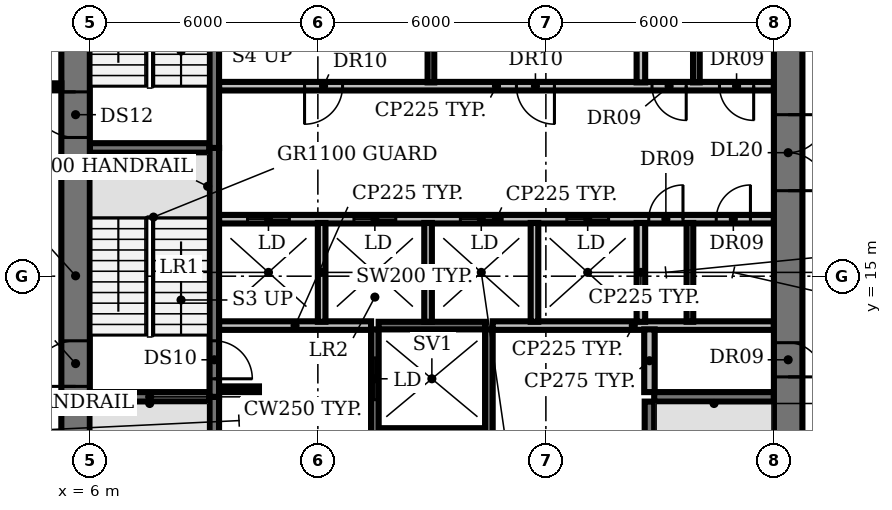
"""IFC4 building model, lengths in metres.
Left out: names, types, materials, properties, quantities, classifications, styles, units other than length and angle.
Written with IfcOpenShell. Run it as: python <this file> out.ifc"""

import sys

from ifc_helpers import new_model, si_unit, direction, frame, frame_2d, origin, place, context, subcontext, project, spatial, rectangle, extrude, element, fill, save


model = new_model("IFC4")
c1 = context("Model", 3, precision=1e-05, world=origin(), true_north=direction((0.0, 1.0)))
c2 = subcontext(c1, "Body", "Model", "MODEL_VIEW")
j1 = project(units=[si_unit("LENGTHUNIT", "METRE"), si_unit("PLANEANGLEUNIT", "RADIAN")], contexts=[c1])
p1 = place(None, origin())
s1 = spatial("IfcSite", under=j1, at=p1, CompositionType="ELEMENT")
p2 = place(p1, origin())
s2 = spatial("IfcBuilding", under=s1, at=p2, CompositionType="ELEMENT")
p3 = place(p2, frame((0.0, 0.0, 113.0)))
s3 = spatial("IfcBuildingStorey", under=s2, at=p3, CompositionType="ELEMENT", Elevation=113.0)
p4 = place(p3, frame((13.6, 10.9, 0.0), z_axis=(0.0, 0.0, 1.0), x_axis=(1.0, 0.0, 0.0)))
e1 = element("IfcWall", 1, at=p4, inside=s3, PredefinedType="SHEAR", context=c2, shape_type="SweptSolid", body=[
    extrude(rectangle(XDim=2.8, YDim=0.2, at=frame_2d((1.4, 0.0))), origin(), (0.0, 0.0, 1.0), 3.85),
])
for number, where, z_axis, x_axis in (
    (2, (6.0, 11.825, 0.0), (0.0, 0.0, 1.0), (1.0, 0.0, 0.0)),
    (3, (20.85, 11.825, 0.0), (0.0, 0.0, 1.0), (1.0, 0.0, 0.0)),
):
    element("IfcWall", number, at=place(p3, frame(where, z_axis=z_axis, x_axis=x_axis)), inside=s3, PredefinedType="SHEAR", context=c2, shape_type="SweptSolid", body=[
        extrude(rectangle(XDim=3.15, YDim=0.25, at=frame_2d((1.575, 0.0))), origin(), (0.0, 0.0, 1.0), 3.85),
    ])
p5 = place(p3, frame((9.4, 12.025, 0.0), z_axis=(0.0, 0.0, 1.0), x_axis=(1.0, 0.0, 0.0)))
e4 = element("IfcWall", 4, at=p5, inside=s3, PredefinedType="SHEAR", context=c2, shape_type="SweptSolid", body=[
    extrude(rectangle(XDim=1.05, YDim=0.15, at=frame_2d((0.525, 0.0))), origin(), (0.0, 0.0, 1.0), 3.85),
])
p6 = place(p3, frame((9.4, 13.7, 0.0), z_axis=(0.0, 0.0, 1.0), x_axis=(1.0, 0.0, 0.0)))
e5 = element("IfcWall", 5, at=p6, inside=s3, PredefinedType="PARTITIONING", context=c2, shape_type="SweptSolid", body=[
    extrude(rectangle(XDim=4.0, YDim=0.225, at=frame_2d((2.0, 0.0))), origin(), (0.0, 0.0, 1.0), 3.85),
])
p7 = place(p3, frame((13.6, 13.7, 0.0), z_axis=(0.0, 0.0, 1.0), x_axis=(1.0, 0.0, 0.0)))
e6 = element("IfcWall", 6, at=p7, inside=s3, PredefinedType="SHEAR", context=c2, shape_type="SweptSolid", body=[
    extrude(rectangle(XDim=2.8, YDim=0.2, at=frame_2d((1.4, 0.0))), origin(), (0.0, 0.0, 1.0), 3.85),
])
p8 = place(p3, frame((16.6, 13.7, 0.0), z_axis=(0.0, 0.0, 1.0), x_axis=(1.0, 0.0, 0.0)))
e7 = element("IfcWall", 7, at=p8, inside=s3, PredefinedType="PARTITIONING", context=c2, shape_type="SweptSolid", body=[
    extrude(rectangle(XDim=7.4, YDim=0.225, at=frame_2d((3.7, 0.0))), origin(), (0.0, 0.0, 1.0), 3.85),
])
p9 = place(p3, frame((9.4, 16.5, 0.0), z_axis=(0.0, 0.0, 1.0), x_axis=(1.0, 0.0, 0.0)))
e8 = element("IfcWall", 8, at=p9, inside=s3, PredefinedType="PARTITIONING", context=c2, shape_type="SweptSolid", body=[
    extrude(rectangle(XDim=14.6, YDim=0.225, at=frame_2d((7.3, 0.0))), origin(), (0.0, 0.0, 1.0), 3.85),
])
p10 = place(p9, frame((0.75, 0.0, 0.0)))
e9 = element("IfcOpeningElement", 9, at=p10, cuts=e8, PredefinedType="OPENING", context=c2, shape_type="SweptSolid", body=[
    extrude(rectangle(XDim=1.1, YDim=2.1, at=frame_2d((0.55, 1.05))), frame((0.0, 0.123, 0.0), z_axis=(0.0, -1.0, 0.0), x_axis=(1.0, 0.0, 0.0)), (0.0, 0.0, 1.0), 0.245),
])
p11 = place(p9, frame((3.55, 0.0, 0.0)))
e10 = element("IfcOpeningElement", 10, at=p11, cuts=e8, PredefinedType="OPENING", context=c2, shape_type="SweptSolid", body=[
    extrude(rectangle(XDim=1.1, YDim=2.1, at=frame_2d((0.55, 1.05))), frame((0.0, 0.123, 0.0), z_axis=(0.0, -1.0, 0.0), x_axis=(1.0, 0.0, 0.0)), (0.0, 0.0, 1.0), 0.245),
])
p12 = place(p9, frame((6.35, 0.0, 0.0)))
e11 = element("IfcOpeningElement", 11, at=p12, cuts=e8, PredefinedType="OPENING", context=c2, shape_type="SweptSolid", body=[
    extrude(rectangle(XDim=1.1, YDim=2.1, at=frame_2d((0.55, 1.05))), frame((0.0, 0.123, 0.0), z_axis=(0.0, -1.0, 0.0), x_axis=(1.0, 0.0, 0.0)), (0.0, 0.0, 1.0), 0.245),
])
p13 = place(p9, frame((9.15, 0.0, 0.0)))
e12 = element("IfcOpeningElement", 12, at=p13, cuts=e8, PredefinedType="OPENING", context=c2, shape_type="SweptSolid", body=[
    extrude(rectangle(XDim=1.1, YDim=2.1, at=frame_2d((0.55, 1.05))), frame((0.0, 0.123, 0.0), z_axis=(0.0, -1.0, 0.0), x_axis=(1.0, 0.0, 0.0)), (0.0, 0.0, 1.0), 0.245),
])
p14 = place(p9, frame((11.308, 0.0, 0.0)))
e13 = element("IfcOpeningElement", 13, at=p14, cuts=e8, PredefinedType="OPENING", context=c2, shape_type="SweptSolid", body=[
    extrude(rectangle(XDim=0.9, YDim=2.1, at=frame_2d((0.45, 1.05))), frame((0.0, 0.123, 0.0), z_axis=(0.0, -1.0, 0.0), x_axis=(1.0, 0.0, 0.0)), (0.0, 0.0, 1.0), 0.245),
])
p15 = place(p9, frame((13.083, 0.0, 0.0)))
e14 = element("IfcOpeningElement", 14, at=p15, cuts=e8, PredefinedType="OPENING", context=c2, shape_type="SweptSolid", body=[
    extrude(rectangle(XDim=0.9, YDim=2.1, at=frame_2d((0.45, 1.05))), frame((0.0, 0.123, 0.0), z_axis=(0.0, -1.0, 0.0), x_axis=(1.0, 0.0, 0.0)), (0.0, 0.0, 1.0), 0.245),
])
p16 = place(p3, frame((6.0, 18.375, 0.0), z_axis=(0.0, 0.0, 1.0), x_axis=(1.0, 0.0, 0.0)))
e15 = element("IfcWall", 15, at=p16, inside=s3, PredefinedType="SHEAR", context=c2, shape_type="SweptSolid", body=[
    extrude(rectangle(XDim=3.15, YDim=0.25, at=frame_2d((1.575, 0.0))), origin(), (0.0, 0.0, 1.0), 3.85),
])
p17 = place(p3, frame((24.0, 20.0, 0.0), z_axis=(0.0, 0.0, 1.0), x_axis=(-1.0, 0.0, 0.0)))
e16 = element("IfcWall", 16, at=p17, inside=s3, PredefinedType="PARTITIONING", context=c2, shape_type="SweptSolid", body=[
    extrude(rectangle(XDim=14.6, YDim=0.225, at=frame_2d((7.3, 0.0))), origin(), (0.0, 0.0, 1.0), 3.85),
])
p18 = place(p17, frame((11.35, 0.0, 0.0)))
e17 = element("IfcOpeningElement", 17, at=p18, cuts=e16, PredefinedType="OPENING", context=c2, shape_type="SweptSolid", body=[
    extrude(rectangle(XDim=1.0, YDim=2.1, at=frame_2d((0.5, 1.05))), frame((0.0, 0.123, 0.0), z_axis=(0.0, -1.0, 0.0), x_axis=(1.0, 0.0, 0.0)), (0.0, 0.0, 1.0), 0.245),
])
p19 = place(p17, frame((5.775, 0.0, 0.0)))
e18 = element("IfcOpeningElement", 18, at=p19, cuts=e16, PredefinedType="OPENING", context=c2, shape_type="SweptSolid", body=[
    extrude(rectangle(XDim=1.0, YDim=2.1, at=frame_2d((0.5, 1.05))), frame((0.0, 0.123, 0.0), z_axis=(0.0, -1.0, 0.0), x_axis=(1.0, 0.0, 0.0)), (0.0, 0.0, 1.0), 0.245),
])
p20 = place(p17, frame((2.308, 0.0, 0.0)))
e19 = element("IfcOpeningElement", 19, at=p20, cuts=e16, PredefinedType="OPENING", context=c2, shape_type="SweptSolid", body=[
    extrude(rectangle(XDim=0.9, YDim=2.1, at=frame_2d((0.45, 1.05))), frame((0.0, 0.123, 0.0), z_axis=(0.0, -1.0, 0.0), x_axis=(1.0, 0.0, 0.0)), (0.0, 0.0, 1.0), 0.245),
])
p21 = place(p17, frame((0.532, 0.0, 0.0)))
e20 = element("IfcOpeningElement", 20, at=p21, cuts=e16, PredefinedType="OPENING", context=c2, shape_type="SweptSolid", body=[
    extrude(rectangle(XDim=0.9, YDim=2.1, at=frame_2d((0.45, 1.05))), frame((0.0, 0.123, 0.0), z_axis=(0.0, -1.0, 0.0), x_axis=(1.0, 0.0, 0.0)), (0.0, 0.0, 1.0), 0.245),
])
p22 = place(p3, frame((9.275, 11.825, 0.0), z_axis=(0.0, 0.0, 1.0), x_axis=(0.0, -1.0, 0.0)))
e21 = element("IfcWall", 21, at=p22, inside=s3, PredefinedType="SHEAR", context=c2, shape_type="SweptSolid", body=[
    extrude(rectangle(XDim=6.425, YDim=0.25, at=frame_2d((3.212, 0.0))), origin(), (0.0, 0.0, 1.0), 3.85),
])
p23 = place(p22, frame((5.075, 0.0, 0.0)))
e22 = element("IfcOpeningElement", 22, at=p23, cuts=e21, PredefinedType="OPENING", context=c2, shape_type="SweptSolid", body=[
    extrude(rectangle(XDim=1.0, YDim=2.1, at=frame_2d((0.5, 1.05))), frame((0.0, 0.135, 0.0), z_axis=(0.0, -1.0, 0.0), x_axis=(1.0, 0.0, 0.0)), (0.0, 0.0, 1.0), 0.27),
])
p24 = place(p3, frame((9.275, 18.375, 0.0), z_axis=(0.0, 0.0, 1.0), x_axis=(0.0, -1.0, 0.0)))
e23 = element("IfcWall", 23, at=p24, inside=s3, PredefinedType="SHEAR", context=c2, shape_type="SweptSolid", body=[
    extrude(rectangle(XDim=6.55, YDim=0.25, at=frame_2d((3.275, 0.0))), origin(), (0.0, 0.0, 1.0), 3.85),
])
p25 = place(p24, frame((5.075, 0.0, 0.0)))
e24 = element("IfcOpeningElement", 24, at=p25, cuts=e23, PredefinedType="OPENING", context=c2, shape_type="SweptSolid", body=[
    extrude(rectangle(XDim=1.0, YDim=2.1, at=frame_2d((0.5, 1.05))), frame((0.0, 0.135, 0.0), z_axis=(0.0, -1.0, 0.0), x_axis=(1.0, 0.0, 0.0)), (0.0, 0.0, 1.0), 0.27),
])
p26 = place(p3, frame((9.275, 18.375, 0.0), z_axis=(0.0, 0.0, 1.0), x_axis=(0.0, 1.0, 0.0)))
e25 = element("IfcWall", 25, at=p26, inside=s3, PredefinedType="SHEAR", context=c2, shape_type="SweptSolid", body=[
    extrude(rectangle(XDim=6.425, YDim=0.25, at=frame_2d((3.212, 0.0))), origin(), (0.0, 0.0, 1.0), 3.85),
])
p27 = place(p3, frame((12.1, 13.8, 0.0), z_axis=(0.0, 0.0, 1.0), x_axis=(0.0, 1.0, 0.0)))
e26 = element("IfcWall", 26, at=p27, inside=s3, PredefinedType="SOLIDWALL", context=c2, shape_type="SweptSolid", body=[
    extrude(rectangle(XDim=2.6, YDim=0.2, at=frame_2d((1.3, 0.0))), origin(), (0.0, 0.0, 1.0), 3.85),
])
p28 = place(p3, frame((13.5, 5.4, 0.0), z_axis=(0.0, 0.0, 1.0), x_axis=(0.0, 1.0, 0.0)))
e27 = element("IfcWall", 27, at=p28, inside=s3, PredefinedType="SHEAR", context=c2, shape_type="SweptSolid", body=[
    extrude(rectangle(XDim=8.2, YDim=0.2, at=frame_2d((4.1, 0.0))), origin(), (0.0, 0.0, 1.0), 3.85),
])
p29 = place(p28, frame((0.75, 0.0, 0.0)))
e28 = element("IfcOpeningElement", 28, at=p29, cuts=e27, PredefinedType="OPENING", context=c2, shape_type="SweptSolid", body=[
    extrude(rectangle(XDim=1.1, YDim=2.1, at=frame_2d((0.55, 1.05))), frame((0.0, 0.11, 0.0), z_axis=(0.0, -1.0, 0.0), x_axis=(1.0, 0.0, 0.0)), (0.0, 0.0, 1.0), 0.22),
])
p30 = place(p28, frame((3.55, 0.0, 0.0)))
e29 = element("IfcOpeningElement", 29, at=p30, cuts=e27, PredefinedType="OPENING", context=c2, shape_type="SweptSolid", body=[
    extrude(rectangle(XDim=1.1, YDim=2.1, at=frame_2d((0.55, 1.05))), frame((0.0, 0.11, 0.0), z_axis=(0.0, -1.0, 0.0), x_axis=(1.0, 0.0, 0.0)), (0.0, 0.0, 1.0), 0.22),
])
p31 = place(p28, frame((6.35, 0.0, 0.0)))
e30 = element("IfcOpeningElement", 30, at=p31, cuts=e27, PredefinedType="OPENING", context=c2, shape_type="SweptSolid", body=[
    extrude(rectangle(XDim=1.1, YDim=2.1, at=frame_2d((0.55, 1.05))), frame((0.0, 0.11, 0.0), z_axis=(0.0, -1.0, 0.0), x_axis=(1.0, 0.0, 0.0)), (0.0, 0.0, 1.0), 0.22),
])
p32 = place(p3, frame((14.9, 13.8, 0.0), z_axis=(0.0, 0.0, 1.0), x_axis=(0.0, 1.0, 0.0)))
e31 = element("IfcWall", 31, at=p32, inside=s3, PredefinedType="SOLIDWALL", context=c2, shape_type="SweptSolid", body=[
    extrude(rectangle(XDim=2.6, YDim=0.2, at=frame_2d((1.3, 0.0))), origin(), (0.0, 0.0, 1.0), 3.85),
])
p33 = place(p3, frame((14.975, 20.1, 0.0), z_axis=(0.0, 0.0, 1.0), x_axis=(0.0, 1.0, 0.0)))
e32 = element("IfcWall", 32, at=p33, inside=s3, PredefinedType="PARTITIONING", context=c2, shape_type="SweptSolid", body=[
    extrude(rectangle(XDim=2.6, YDim=0.175, at=frame_2d((1.3, 0.0))), origin(), (0.0, 0.0, 1.0), 3.85),
])
p34 = place(p3, frame((16.5, 5.4, 0.0), z_axis=(0.0, 0.0, 1.0), x_axis=(0.0, 1.0, 0.0)))
e33 = element("IfcWall", 33, at=p34, inside=s3, PredefinedType="SHEAR", context=c2, shape_type="SweptSolid", body=[
    extrude(rectangle(XDim=8.2, YDim=0.2, at=frame_2d((4.1, 0.0))), origin(), (0.0, 0.0, 1.0), 3.85),
])
p35 = place(p3, frame((17.7, 13.8, 0.0), z_axis=(0.0, 0.0, 1.0), x_axis=(0.0, 1.0, 0.0)))
e34 = element("IfcWall", 34, at=p35, inside=s3, PredefinedType="SOLIDWALL", context=c2, shape_type="SweptSolid", body=[
    extrude(rectangle(XDim=2.6, YDim=0.2, at=frame_2d((1.3, 0.0))), origin(), (0.0, 0.0, 1.0), 3.85),
])
for number, where, z_axis, x_axis in (
    (35, (20.5, 13.8, 0.0), (0.0, 0.0, 1.0), (0.0, 1.0, 0.0)),
    (36, (20.5, 20.1, 0.0), (0.0, 0.0, 1.0), (0.0, 1.0, 0.0)),
):
    element("IfcWall", number, at=place(p3, frame(where, z_axis=z_axis, x_axis=x_axis)), inside=s3, PredefinedType="PARTITIONING", context=c2, shape_type="SweptSolid", body=[
        extrude(rectangle(XDim=2.6, YDim=0.225, at=frame_2d((1.3, 0.0))), origin(), (0.0, 0.0, 1.0), 3.85),
    ])
p36 = place(p3, frame((20.725, 5.4, 0.0), z_axis=(0.0, 0.0, 1.0), x_axis=(0.0, 1.0, 0.0)))
e37 = element("IfcWall", 37, at=p36, inside=s3, PredefinedType="SHEAR", context=c2, shape_type="SweptSolid", body=[
    extrude(rectangle(XDim=6.3, YDim=0.25, at=frame_2d((3.15, 0.0))), origin(), (0.0, 0.0, 1.0), 3.85),
])
p37 = place(p3, frame((20.725, 11.95, 0.0), z_axis=(0.0, 0.0, 1.0), x_axis=(0.0, 1.0, 0.0)))
e38 = element("IfcWall", 38, at=p37, inside=s3, PredefinedType="PARTITIONING", context=c2, shape_type="SweptSolid", body=[
    extrude(rectangle(XDim=1.65, YDim=0.275, at=frame_2d((0.825, 0.0))), origin(), (0.0, 0.0, 1.0), 3.85),
])
for number, where, z_axis, x_axis in (
    (39, (21.79, 13.8, 0.0), (0.0, 0.0, 1.0), (0.0, 1.0, 0.0)),
    (40, (21.96, 20.1, 0.0), (0.0, 0.0, 1.0), (0.0, 1.0, 0.0)),
):
    element("IfcWall", number, at=place(p3, frame(where, z_axis=z_axis, x_axis=x_axis)), inside=s3, PredefinedType="PARTITIONING", context=c2, shape_type="SweptSolid", body=[
        extrude(rectangle(XDim=2.6, YDim=0.175, at=frame_2d((1.3, 0.0))), origin(), (0.0, 0.0, 1.0), 3.85),
    ])
p38 = place(p3, frame((5.625, 4.47, 0.0), z_axis=(0.0, 0.0, 1.0), x_axis=(0.0, 1.0, 0.0)))
e41 = element("IfcWall", 41, at=p38, inside=s3, PredefinedType="SHEAR", context=c2, shape_type="SweptSolid", body=[
    extrude(rectangle(XDim=21.08, YDim=0.75, at=frame_2d((10.54, 0.0))), origin(), (0.0, 0.0, 1.0), 3.85),
])
p39 = place(p38, frame((1.18, 0.0, 0.0)))
e42 = element("IfcOpeningElement", 42, at=p39, cuts=e41, PredefinedType="OPENING", context=c2, shape_type="SweptSolid", body=[
    extrude(rectangle(XDim=1.5, YDim=2.1, at=frame_2d((0.75, 1.05))), frame((0.0, 0.385, 0.0), z_axis=(0.0, -1.0, 0.0), x_axis=(1.0, 0.0, 0.0)), (0.0, 0.0, 1.0), 0.77),
])
p40 = place(p38, frame((7.63, 0.0, 0.0)))
e43 = element("IfcOpeningElement", 43, at=p40, cuts=e41, PredefinedType="OPENING", context=c2, shape_type="SweptSolid", body=[
    extrude(rectangle(XDim=1.2, YDim=2.1, at=frame_2d((0.6, 1.05))), frame((0.0, 0.385, 0.0), z_axis=(0.0, -1.0, 0.0), x_axis=(1.0, 0.0, 0.0)), (0.0, 0.0, 1.0), 0.77),
])
p41 = place(p38, frame((14.18, 0.0, 0.0)))
e44 = element("IfcOpeningElement", 44, at=p41, cuts=e41, PredefinedType="OPENING", context=c2, shape_type="SweptSolid", body=[
    extrude(rectangle(XDim=1.2, YDim=2.1, at=frame_2d((0.6, 1.05))), frame((0.0, 0.385, 0.0), z_axis=(0.0, -1.0, 0.0), x_axis=(1.0, 0.0, 0.0)), (0.0, 0.0, 1.0), 0.77),
])
p42 = place(p3, frame((24.375, 25.55, 0.0), z_axis=(0.0, 0.0, 1.0), x_axis=(0.0, -1.0, 0.0)))
e45 = element("IfcWall", 45, at=p42, inside=s3, PredefinedType="SHEAR", context=c2, shape_type="SweptSolid", body=[
    extrude(rectangle(XDim=21.13, YDim=0.75, at=frame_2d((10.565, 0.0))), origin(), (0.0, 0.0, 1.0), 3.85),
])
p43 = place(p42, frame((18.4, 0.0, 0.0)))
e46 = element("IfcOpeningElement", 46, at=p43, cuts=e45, PredefinedType="OPENING", context=c2, shape_type="SweptSolid", body=[
    extrude(rectangle(XDim=1.5, YDim=2.1, at=frame_2d((0.75, 1.05))), frame((0.0, 0.385, 0.0), z_axis=(0.0, -1.0, 0.0), x_axis=(1.0, 0.0, 0.0)), (0.0, 0.0, 1.0), 0.77),
])
p44 = place(p42, frame((12.3, 0.0, 0.0)))
e47 = element("IfcOpeningElement", 47, at=p44, cuts=e45, PredefinedType="OPENING", context=c2, shape_type="SweptSolid", body=[
    extrude(rectangle(XDim=0.9, YDim=2.1, at=frame_2d((0.45, 1.05))), frame((0.0, 0.385, 0.0), z_axis=(0.0, -1.0, 0.0), x_axis=(1.0, 0.0, 0.0)), (0.0, 0.0, 1.0), 0.77),
])
p45 = place(p42, frame((6.3, 0.0, 0.0)))
e48 = element("IfcOpeningElement", 48, at=p45, cuts=e45, PredefinedType="OPENING", context=c2, shape_type="SweptSolid", body=[
    extrude(rectangle(XDim=2.0, YDim=2.1, at=frame_2d((1.0, 1.05))), frame((0.0, 0.385, 0.0), z_axis=(0.0, -1.0, 0.0), x_axis=(1.0, 0.0, 0.0)), (0.0, 0.0, 1.0), 0.77),
])
p46 = place(p3, frame((4.2, 20.0, 0.0), z_axis=(0.0, 0.0, 1.0), x_axis=(1.0, 0.0, 0.0)))
e49 = element("IfcWall", 49, at=p46, inside=s3, PredefinedType="PARTITIONING", context=c2, shape_type="SweptSolid", body=[
    extrude(rectangle(XDim=1.05, YDim=0.15, at=frame_2d((0.525, 0.0))), origin(), (0.0, 0.0, 1.0), 2.83),
])
p47 = place(p10, origin())
e50 = element("IfcDoor", 50, at=p47, inside=s3, OperationType="DOUBLE_DOOR_SLIDING", PredefinedType="DOOR", context=c2, shape_type="SweptSolid", body=[
    extrude(rectangle(XDim=1.1, YDim=2.1, at=frame_2d((0.55, 1.05))), frame((0.0, 0.025, 0.0), z_axis=(0.0, -1.0, 0.0), x_axis=(1.0, 0.0, 0.0)), (0.0, 0.0, 1.0), 0.05),
])
fill(e9, e50)
p48 = place(p11, origin())
e51 = element("IfcDoor", 51, at=p48, inside=s3, OperationType="DOUBLE_DOOR_SLIDING", PredefinedType="DOOR", context=c2, shape_type="SweptSolid", body=[
    extrude(rectangle(XDim=1.1, YDim=2.1, at=frame_2d((0.55, 1.05))), frame((0.0, 0.025, 0.0), z_axis=(0.0, -1.0, 0.0), x_axis=(1.0, 0.0, 0.0)), (0.0, 0.0, 1.0), 0.05),
])
fill(e10, e51)
p49 = place(p12, origin())
e52 = element("IfcDoor", 52, at=p49, inside=s3, OperationType="DOUBLE_DOOR_SLIDING", PredefinedType="DOOR", context=c2, shape_type="SweptSolid", body=[
    extrude(rectangle(XDim=1.1, YDim=2.1, at=frame_2d((0.55, 1.05))), frame((0.0, 0.025, 0.0), z_axis=(0.0, -1.0, 0.0), x_axis=(1.0, 0.0, 0.0)), (0.0, 0.0, 1.0), 0.05),
])
fill(e11, e52)
p50 = place(p13, origin())
e53 = element("IfcDoor", 53, at=p50, inside=s3, OperationType="DOUBLE_DOOR_SLIDING", PredefinedType="DOOR", context=c2, shape_type="SweptSolid", body=[
    extrude(rectangle(XDim=1.1, YDim=2.1, at=frame_2d((0.55, 1.05))), frame((0.0, 0.025, 0.0), z_axis=(0.0, -1.0, 0.0), x_axis=(1.0, 0.0, 0.0)), (0.0, 0.0, 1.0), 0.05),
])
fill(e12, e53)
p51 = place(p14, origin())
e54 = element("IfcDoor", 54, at=p51, inside=s3, OperationType="SINGLE_SWING_RIGHT", PredefinedType="DOOR", context=c2, shape_type="SweptSolid", body=[
    extrude(rectangle(XDim=0.9, YDim=2.1, at=frame_2d((0.45, 1.05))), frame((0.0, 0.025, 0.0), z_axis=(0.0, -1.0, 0.0), x_axis=(1.0, 0.0, 0.0)), (0.0, 0.0, 1.0), 0.05),
])
fill(e13, e54)
p52 = place(p15, origin())
e55 = element("IfcDoor", 55, at=p52, inside=s3, OperationType="SINGLE_SWING_RIGHT", PredefinedType="DOOR", context=c2, shape_type="SweptSolid", body=[
    extrude(rectangle(XDim=0.9, YDim=2.1, at=frame_2d((0.45, 1.05))), frame((0.0, 0.025, 0.0), z_axis=(0.0, -1.0, 0.0), x_axis=(1.0, 0.0, 0.0)), (0.0, 0.0, 1.0), 0.05),
])
fill(e14, e55)
p53 = place(p18, origin())
e56 = element("IfcDoor", 56, at=p53, inside=s3, OperationType="SINGLE_SWING_RIGHT", PredefinedType="DOOR", context=c2, shape_type="SweptSolid", body=[
    extrude(rectangle(XDim=1.0, YDim=2.1, at=frame_2d((0.5, 1.05))), frame((0.0, 0.025, 0.0), z_axis=(0.0, -1.0, 0.0), x_axis=(1.0, 0.0, 0.0)), (0.0, 0.0, 1.0), 0.05),
])
fill(e17, e56)
p54 = place(p19, origin())
e57 = element("IfcDoor", 57, at=p54, inside=s3, OperationType="SINGLE_SWING_LEFT", PredefinedType="DOOR", context=c2, shape_type="SweptSolid", body=[
    extrude(rectangle(XDim=1.0, YDim=2.1, at=frame_2d((0.5, 1.05))), frame((0.0, 0.025, 0.0), z_axis=(0.0, -1.0, 0.0), x_axis=(1.0, 0.0, 0.0)), (0.0, 0.0, 1.0), 0.05),
])
fill(e18, e57)
p55 = place(p20, origin())
e58 = element("IfcDoor", 58, at=p55, inside=s3, OperationType="SINGLE_SWING_LEFT", PredefinedType="DOOR", context=c2, shape_type="SweptSolid", body=[
    extrude(rectangle(XDim=0.9, YDim=2.1, at=frame_2d((0.45, 1.05))), frame((0.0, 0.025, 0.0), z_axis=(0.0, -1.0, 0.0), x_axis=(1.0, 0.0, 0.0)), (0.0, 0.0, 1.0), 0.05),
])
fill(e19, e58)
p56 = place(p21, origin())
e59 = element("IfcDoor", 59, at=p56, inside=s3, OperationType="SINGLE_SWING_LEFT", PredefinedType="DOOR", context=c2, shape_type="SweptSolid", body=[
    extrude(rectangle(XDim=0.9, YDim=2.1, at=frame_2d((0.45, 1.05))), frame((0.0, 0.025, 0.0), z_axis=(0.0, -1.0, 0.0), x_axis=(1.0, 0.0, 0.0)), (0.0, 0.0, 1.0), 0.05),
])
fill(e20, e59)
p57 = place(p25, origin())
e60 = element("IfcDoor", 60, at=p57, inside=s3, OperationType="SINGLE_SWING_RIGHT", PredefinedType="DOOR", context=c2, shape_type="SweptSolid", body=[
    extrude(rectangle(XDim=1.0, YDim=2.1, at=frame_2d((0.5, 1.05))), frame((0.0, 0.025, 0.0), z_axis=(0.0, -1.0, 0.0), x_axis=(1.0, 0.0, 0.0)), (0.0, 0.0, 1.0), 0.05),
])
fill(e24, e60)
p58 = place(p31, origin())
e61 = element("IfcDoor", 61, at=p58, inside=s3, OperationType="DOUBLE_DOOR_SLIDING", PredefinedType="DOOR", context=c2, shape_type="SweptSolid", body=[
    extrude(rectangle(XDim=1.1, YDim=2.1, at=frame_2d((0.55, 1.05))), frame((0.0, 0.025, 0.0), z_axis=(0.0, -1.0, 0.0), x_axis=(1.0, 0.0, 0.0)), (0.0, 0.0, 1.0), 0.05),
])
fill(e30, e61)
p59 = place(p40, origin())
e62 = element("IfcDoor", 62, at=p59, inside=s3, OperationType="SINGLE_SWING_LEFT", PredefinedType="DOOR", context=c2, shape_type="SweptSolid", body=[
    extrude(rectangle(XDim=1.2, YDim=2.1, at=frame_2d((0.6, 1.05))), frame((0.0, 0.025, 0.0), z_axis=(0.0, -1.0, 0.0), x_axis=(1.0, 0.0, 0.0)), (0.0, 0.0, 1.0), 0.05),
])
fill(e43, e62)
p60 = place(p41, origin())
e63 = element("IfcDoor", 63, at=p60, inside=s3, OperationType="SINGLE_SWING_RIGHT", PredefinedType="DOOR", context=c2, shape_type="SweptSolid", body=[
    extrude(rectangle(XDim=1.2, YDim=2.1, at=frame_2d((0.6, 1.05))), frame((0.0, 0.025, 0.0), z_axis=(0.0, -1.0, 0.0), x_axis=(1.0, 0.0, 0.0)), (0.0, 0.0, 1.0), 0.05),
])
fill(e44, e63)
p61 = place(p44, origin())
e64 = element("IfcDoor", 64, at=p61, inside=s3, OperationType="SINGLE_SWING_RIGHT", PredefinedType="DOOR", context=c2, shape_type="SweptSolid", body=[
    extrude(rectangle(XDim=0.9, YDim=2.1, at=frame_2d((0.45, 1.05))), frame((0.0, -0.315, 0.0), z_axis=(0.0, -1.0, 0.0), x_axis=(1.0, 0.0, 0.0)), (0.0, 0.0, 1.0), 0.05),
])
fill(e47, e64)
p62 = place(p45, origin())
e65 = element("IfcDoor", 65, at=p62, inside=s3, OperationType="DOUBLE_DOOR_SINGLE_SWING", PredefinedType="DOOR", context=c2, shape_type="SweptSolid", body=[
    extrude(rectangle(XDim=2.0, YDim=2.1, at=frame_2d((1.0, 1.05))), frame((0.0, 0.025, 0.0), z_axis=(0.0, -1.0, 0.0), x_axis=(1.0, 0.0, 0.0)), (0.0, 0.0, 1.0), 0.05),
])
fill(e48, e65)
save(model, sys.argv[1])
